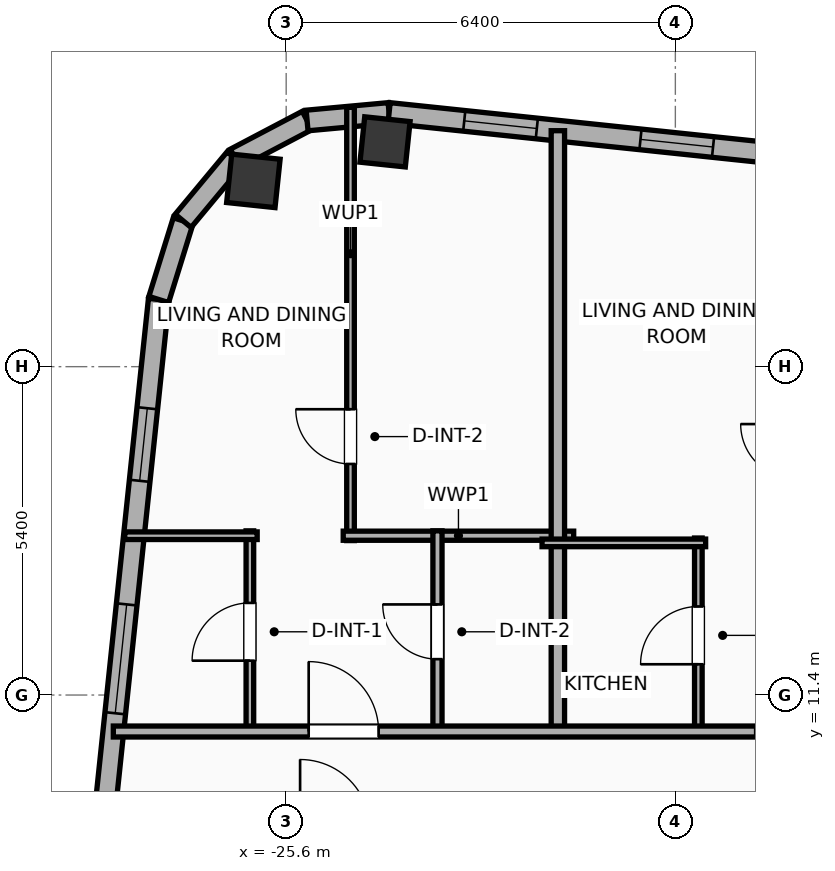
"""IFC4 building model, lengths in metres.
Left out: names, types, materials, properties, quantities, classifications, styles, units other than length and angle.
Written with IfcOpenShell. Run it as: python <this file> out.ifc"""

import sys

from ifc_helpers import new_model, si_unit, direction, frame, frame_2d, origin, origin_2d, place, context, subcontext, project, spatial, rectangle, hollow_rectangle, hollow_circle, extrude, element, fill, save


model = new_model("IFC4")
c1 = context("Model", 3, precision=1e-05, world=origin(), true_north=direction((0.0, 1.0)))
c2 = subcontext(c1, "Body", "Model", "MODEL_VIEW")
j1 = project(units=[si_unit("LENGTHUNIT", "METRE"), si_unit("PLANEANGLEUNIT", "RADIAN")], contexts=[c1])
p1 = place(None, origin())
s1 = spatial("IfcSite", under=j1, at=p1, CompositionType="ELEMENT")
p2 = place(p1, origin())
s2 = spatial("IfcBuilding", under=s1, at=p2, CompositionType="ELEMENT")
p3 = place(p2, frame((0.0, 0.0, 279.5)))
s3 = spatial("IfcBuildingStorey", under=s2, at=p3, CompositionType="ELEMENT", Elevation=279.5)
p4 = place(p3, frame((-23.975, 20.497, 0.0), z_axis=(0.0, 0.0, 1.0), x_axis=(0.994521895368, -0.104528463268, 0.0)))
e1 = element("IfcColumn", 1, at=p4, inside=s3, PredefinedType="COLUMN", context=c2, shape_type="SweptSolid", body=[
    extrude(hollow_rectangle(XDim=0.75, YDim=0.75, WallThickness=0.025, at=origin_2d()), origin(), (0.0, 0.0, 1.0), 3.9),
])
p5 = place(p3, frame((-26.139, 19.855, 0.0), z_axis=(0.0, 0.0, 1.0), x_axis=(0.994521895368, -0.104528463268, 0.0)))
e2 = element("IfcColumn", 2, at=p5, inside=s3, PredefinedType="COLUMN", context=c2, shape_type="SweptSolid", body=[
    extrude(hollow_circle(Radius=0.4, WallThickness=0.028, at=origin_2d()), origin(), (0.0, 0.0, 1.0), 3.9),
])
p6 = place(p3, frame((-30.87, -12.296, 0.0), z_axis=(0.0, 0.0, 1.0), x_axis=(0.104533282919, 0.994521388791, 0.0)))
e3 = element("IfcWall", 3, at=p6, inside=s3, PredefinedType="ELEMENTEDWALL", context=c2, shape_type="SweptSolid", body=[
    extrude(rectangle(XDim=30.366, YDim=0.34, at=frame_2d((15.183, 0.0))), origin(), (0.0, 0.0, 1.0), 3.65),
])
p7 = place(p6, frame((5.842, 0.0, 0.75)))
e4 = element("IfcOpeningElement", 4, at=p7, cuts=e3, PredefinedType="OPENING", context=c2, shape_type="SweptSolid", body=[
    extrude(rectangle(XDim=1.8, YDim=2.1, at=frame_2d((0.9, 1.05))), frame((0.0, 0.18, 0.0), z_axis=(0.0, -1.0, 0.0), x_axis=(1.0, 0.0, 0.0)), (0.0, 0.0, 1.0), 0.36),
])
p8 = place(p6, frame((23.525, 0.0, 0.75)))
e5 = element("IfcOpeningElement", 5, at=p8, cuts=e3, PredefinedType="OPENING", context=c2, shape_type="SweptSolid", body=[
    extrude(rectangle(XDim=1.8, YDim=2.1, at=frame_2d((0.9, 1.05))), frame((0.0, 0.18, 0.0), z_axis=(0.0, -1.0, 0.0), x_axis=(1.0, 0.0, 0.0)), (0.0, 0.0, 1.0), 0.36),
])
p9 = place(p6, frame((27.368, 0.0, 0.75)))
e6 = element("IfcOpeningElement", 6, at=p9, cuts=e3, PredefinedType="OPENING", context=c2, shape_type="SweptSolid", body=[
    extrude(rectangle(XDim=1.2, YDim=2.05, at=frame_2d((0.6, 1.025))), frame((0.0, 0.18, 0.0), z_axis=(0.0, -1.0, 0.0), x_axis=(1.0, 0.0, 0.0)), (0.0, 0.0, 1.0), 0.36),
])
p10 = place(p6, frame((16.487, 0.0, 0.75)))
e7 = element("IfcOpeningElement", 7, at=p10, cuts=e3, PredefinedType="OPENING", context=c2, shape_type="SweptSolid", body=[
    extrude(rectangle(XDim=1.2, YDim=2.05, at=frame_2d((0.6, 1.025))), frame((0.0, 0.18, 0.0), z_axis=(0.0, -1.0, 0.0), x_axis=(1.0, 0.0, 0.0)), (0.0, 0.0, 1.0), 0.36),
])
p11 = place(p3, frame((-27.696, 17.905, 0.0), z_axis=(0.0, 0.0, 1.0), x_axis=(0.296416228123, 0.955058856671, 0.0)))
e8 = element("IfcWall", 8, at=p11, inside=s3, PredefinedType="ELEMENTEDWALL", context=c2, shape_type="SweptSolid", body=[
    extrude(rectangle(XDim=1.354, YDim=0.34, at=frame_2d((0.677, 0.0))), origin(), (0.0, 0.0, 1.0), 3.65),
])
p12 = place(p3, frame((-27.294, 19.198, 0.0), z_axis=(0.0, 0.0, 1.0), x_axis=(0.639501603217, 0.768789762863, 0.0)))
e9 = element("IfcWall", 9, at=p12, inside=s3, PredefinedType="ELEMENTEDWALL", context=c2, shape_type="SweptSolid", body=[
    extrude(rectangle(XDim=1.337, YDim=0.34, at=frame_2d((0.668, 0.0))), origin(), (0.0, 0.0, 1.0), 3.65),
])
p13 = place(p3, frame((-26.439, 20.226, 0.0), z_axis=(0.0, 0.0, 1.0), x_axis=(0.884922182678, 0.465738908193, 0.0)))
e10 = element("IfcWall", 10, at=p13, inside=s3, PredefinedType="ELEMENTEDWALL", context=c2, shape_type="SweptSolid", body=[
    extrude(rectangle(XDim=1.337, YDim=0.34, at=frame_2d((0.668, 0.0))), origin(), (0.0, 0.0, 1.0), 3.65),
])
p14 = place(p3, frame((-25.256, 20.848, 0.0), z_axis=(0.0, 0.0, 1.0), x_axis=(0.995813013343, 0.091413579172, 0.0)))
e11 = element("IfcWall", 11, at=p14, inside=s3, PredefinedType="ELEMENTEDWALL", context=c2, shape_type="SweptSolid", body=[
    extrude(rectangle(XDim=1.354, YDim=0.34, at=frame_2d((0.677, 0.0))), origin(), (0.0, 0.0, 1.0), 3.65),
])
p15 = place(p3, frame((-23.908, 20.972, 0.0), z_axis=(0.0, 0.0, 1.0), x_axis=(0.994521888554, -0.104528528102, 0.0)))
e12 = element("IfcWall", 12, at=p15, inside=s3, PredefinedType="ELEMENTEDWALL", context=c2, shape_type="SweptSolid", body=[
    extrude(rectangle(XDim=46.766, YDim=0.34, at=frame_2d((23.383, 0.0))), origin(), (0.0, 0.0, 1.0), 3.65),
])
p16 = place(p15, frame((23.833, 0.0, 0.75)))
e13 = element("IfcOpeningElement", 13, at=p16, cuts=e12, PredefinedType="OPENING", context=c2, shape_type="SweptSolid", body=[
    extrude(rectangle(XDim=2.4, YDim=2.1, at=frame_2d((1.2, 1.05))), frame((0.0, 0.18, 0.0), z_axis=(0.0, -1.0, 0.0), x_axis=(1.0, 0.0, 0.0)), (0.0, 0.0, 1.0), 0.36),
])
p17 = place(p15, frame((1.243, 0.0, 0.75)))
e14 = element("IfcOpeningElement", 14, at=p17, cuts=e12, PredefinedType="OPENING", context=c2, shape_type="SweptSolid", body=[
    extrude(rectangle(XDim=1.2, YDim=2.05, at=frame_2d((0.6, 1.025))), frame((0.0, 0.18, 0.0), z_axis=(0.0, -1.0, 0.0), x_axis=(1.0, 0.0, 0.0)), (0.0, 0.0, 1.0), 0.36),
])
p18 = place(p15, frame((4.157, 0.0, 0.75)))
e15 = element("IfcOpeningElement", 15, at=p18, cuts=e12, PredefinedType="OPENING", context=c2, shape_type="SweptSolid", body=[
    extrude(rectangle(XDim=1.2, YDim=2.05, at=frame_2d((0.6, 1.025))), frame((0.0, 0.18, 0.0), z_axis=(0.0, -1.0, 0.0), x_axis=(1.0, 0.0, 0.0)), (0.0, 0.0, 1.0), 0.36),
])
p19 = place(p15, frame((7.475, 0.0, 0.75)))
e16 = element("IfcOpeningElement", 16, at=p19, cuts=e12, PredefinedType="OPENING", context=c2, shape_type="SweptSolid", body=[
    extrude(rectangle(XDim=1.2, YDim=2.05, at=frame_2d((0.6, 1.025))), frame((0.0, 0.18, 0.0), z_axis=(0.0, -1.0, 0.0), x_axis=(1.0, 0.0, 0.0)), (0.0, 0.0, 1.0), 0.36),
])
p20 = place(p15, frame((11.513, 0.0, 0.75)))
e17 = element("IfcOpeningElement", 17, at=p20, cuts=e12, PredefinedType="OPENING", context=c2, shape_type="SweptSolid", body=[
    extrude(rectangle(XDim=1.2, YDim=2.05, at=frame_2d((0.6, 1.025))), frame((0.0, 0.18, 0.0), z_axis=(0.0, -1.0, 0.0), x_axis=(1.0, 0.0, 0.0)), (0.0, 0.0, 1.0), 0.36),
])
p21 = place(p15, frame((15.192, 0.0, 0.75)))
e18 = element("IfcOpeningElement", 18, at=p21, cuts=e12, PredefinedType="OPENING", context=c2, shape_type="SweptSolid", body=[
    extrude(rectangle(XDim=1.2, YDim=2.05, at=frame_2d((0.6, 1.025))), frame((0.0, 0.18, 0.0), z_axis=(0.0, -1.0, 0.0), x_axis=(1.0, 0.0, 0.0)), (0.0, 0.0, 1.0), 0.36),
])
p22 = place(p15, frame((19.671, 0.0, 0.75)))
e19 = element("IfcOpeningElement", 19, at=p22, cuts=e12, PredefinedType="OPENING", context=c2, shape_type="SweptSolid", body=[
    extrude(rectangle(XDim=1.2, YDim=2.05, at=frame_2d((0.6, 1.025))), frame((0.0, 0.18, 0.0), z_axis=(0.0, -1.0, 0.0), x_axis=(1.0, 0.0, 0.0)), (0.0, 0.0, 1.0), 0.36),
])
p23 = place(p15, frame((29.801, 0.0, 0.75)))
e20 = element("IfcOpeningElement", 20, at=p23, cuts=e12, PredefinedType="OPENING", context=c2, shape_type="SweptSolid", body=[
    extrude(rectangle(XDim=1.2, YDim=2.05, at=frame_2d((0.6, 1.025))), frame((0.0, 0.18, 0.0), z_axis=(0.0, -1.0, 0.0), x_axis=(1.0, 0.0, 0.0)), (0.0, 0.0, 1.0), 0.36),
])
p24 = place(p15, frame((33.35, 0.0, 0.75)))
e21 = element("IfcOpeningElement", 21, at=p24, cuts=e12, PredefinedType="OPENING", context=c2, shape_type="SweptSolid", body=[
    extrude(rectangle(XDim=1.2, YDim=2.05, at=frame_2d((0.6, 1.025))), frame((0.0, 0.18, 0.0), z_axis=(0.0, -1.0, 0.0), x_axis=(1.0, 0.0, 0.0)), (0.0, 0.0, 1.0), 0.36),
])
p25 = place(p15, frame((38.034, 0.0, 0.75)))
e22 = element("IfcOpeningElement", 22, at=p25, cuts=e12, PredefinedType="OPENING", context=c2, shape_type="SweptSolid", body=[
    extrude(rectangle(XDim=0.85, YDim=2.05, at=frame_2d((0.425, 1.025))), frame((0.0, 0.18, 0.0), z_axis=(0.0, -1.0, 0.0), x_axis=(1.0, 0.0, 0.0)), (0.0, 0.0, 1.0), 0.36),
])
p26 = place(p15, frame((40.448, 0.0, 0.75)))
e23 = element("IfcOpeningElement", 23, at=p26, cuts=e12, PredefinedType="OPENING", context=c2, shape_type="SweptSolid", body=[
    extrude(rectangle(XDim=1.2, YDim=2.05, at=frame_2d((0.6, 1.025))), frame((0.0, 0.18, 0.0), z_axis=(0.0, -1.0, 0.0), x_axis=(1.0, 0.0, 0.0)), (0.0, 0.0, 1.0), 0.36),
])
p27 = place(p15, frame((43.718, 0.0, 0.75)))
e24 = element("IfcOpeningElement", 24, at=p27, cuts=e12, PredefinedType="OPENING", context=c2, shape_type="SweptSolid", body=[
    extrude(rectangle(XDim=1.2, YDim=2.05, at=frame_2d((0.6, 1.025))), frame((0.0, 0.18, 0.0), z_axis=(0.0, -1.0, 0.0), x_axis=(1.0, 0.0, 0.0)), (0.0, 0.0, 1.0), 0.36),
])
p28 = place(p3, frame((-24.542, 13.94, 0.0), z_axis=(0.0, 0.0, 1.0), x_axis=(0.0, 1.0, 0.0)))
e25 = element("IfcWall", 25, at=p28, inside=s3, PredefinedType="PARTITIONING", context=c2, shape_type="SweptSolid", body=[
    extrude(rectangle(XDim=7.125, YDim=0.125, at=frame_2d((3.562, 0.0))), origin(), (0.0, 0.0, 1.0), 3.65),
])
p29 = place(p28, frame((1.26, 0.0, 0.0)))
e26 = element("IfcOpeningElement", 26, at=p29, cuts=e25, PredefinedType="OPENING", context=c2, shape_type="SweptSolid", body=[
    extrude(rectangle(XDim=0.9, YDim=2.05, at=frame_2d((0.45, 1.025))), frame((0.0, 0.073, 0.0), z_axis=(0.0, -1.0, 0.0), x_axis=(1.0, 0.0, 0.0)), (0.0, 0.0, 1.0), 0.145),
])
p30 = place(p3, frame((-24.662, 14.02, 0.0), z_axis=(0.0, 0.0, 1.0), x_axis=(1.0, 0.0, 0.0)))
e27 = element("IfcWall", 27, at=p30, inside=s3, PredefinedType="PLUMBINGWALL", context=c2, shape_type="SweptSolid", body=[
    extrude(rectangle(XDim=3.79, YDim=0.15, at=frame_2d((1.895, 0.0))), origin(), (0.0, 0.0, 1.0), 3.65),
])
p31 = place(p3, frame((-26.197, 10.78, 0.0), z_axis=(0.0, 0.0, 1.0), x_axis=(0.0, 1.0, 0.0)))
e28 = element("IfcWall", 28, at=p31, inside=s3, PredefinedType="PARTITIONING", context=c2, shape_type="SweptSolid", body=[
    extrude(rectangle(XDim=3.32, YDim=0.125, at=frame_2d((1.66, 0.0))), origin(), (0.0, 0.0, 1.0), 3.65),
])
p32 = place(p31, frame((1.185, 0.0, 0.0)))
e29 = element("IfcOpeningElement", 29, at=p32, cuts=e28, PredefinedType="OPENING", context=c2, shape_type="SweptSolid", body=[
    extrude(rectangle(XDim=0.95, YDim=2.05, at=frame_2d((0.475, 1.025))), frame((0.0, 0.073, 0.0), z_axis=(0.0, -1.0, 0.0), x_axis=(1.0, 0.0, 0.0)), (0.0, 0.0, 1.0), 0.145),
])
p33 = place(p3, frame((-28.255, 14.02, 0.0), z_axis=(0.0, 0.0, 1.0), x_axis=(1.0, 0.0, 0.0)))
e30 = element("IfcWall", 30, at=p33, inside=s3, PredefinedType="PARTITIONING", context=c2, shape_type="SweptSolid", body=[
    extrude(rectangle(XDim=2.178, YDim=0.125, at=frame_2d((1.089, 0.0))), origin(), (0.0, 0.0, 1.0), 3.65),
])
p34 = place(p3, frame((-23.112, 10.78, 0.0), z_axis=(0.0, 0.0, 1.0), x_axis=(0.0, 1.0, 0.0)))
e31 = element("IfcWall", 31, at=p34, inside=s3, PredefinedType="PLUMBINGWALL", context=c2, shape_type="SweptSolid", body=[
    extrude(rectangle(XDim=3.32, YDim=0.15, at=frame_2d((1.66, 0.0))), origin(), (0.0, 0.0, 1.0), 3.65),
])
p35 = place(p34, frame((1.21, 0.0, 0.0)))
e32 = element("IfcOpeningElement", 32, at=p35, cuts=e31, PredefinedType="OPENING", context=c2, shape_type="SweptSolid", body=[
    extrude(rectangle(XDim=0.9, YDim=2.05, at=frame_2d((0.45, 1.025))), frame((0.0, 0.085, 0.0), z_axis=(0.0, -1.0, 0.0), x_axis=(1.0, 0.0, 0.0)), (0.0, 0.0, 1.0), 0.17),
])
p36 = place(p3, frame((-21.132, 10.72, 0.0), z_axis=(0.0, 0.0, 1.0), x_axis=(0.0, 1.0, 0.0)))
e33 = element("IfcWall", 33, at=p36, inside=s3, PredefinedType="PARTITIONING", context=c2, shape_type="SweptSolid", body=[
    extrude(rectangle(XDim=9.96, YDim=0.22, at=frame_2d((4.98, 0.0))), origin(), (0.0, 0.0, 1.0), 3.09),
])
p37 = place(p3, frame((-18.822, 10.78, 0.0), z_axis=(0.0, 0.0, 1.0), x_axis=(0.0, 1.0, 0.0)))
e34 = element("IfcWall", 34, at=p37, inside=s3, PredefinedType="PARTITIONING", context=c2, shape_type="SweptSolid", body=[
    extrude(rectangle(XDim=3.202, YDim=0.125, at=frame_2d((1.601, 0.0))), origin(), (0.0, 0.0, 1.0), 3.65),
])
p38 = place(p37, frame((1.126, 0.0, 0.0)))
e35 = element("IfcOpeningElement", 35, at=p38, cuts=e34, PredefinedType="OPENING", context=c2, shape_type="SweptSolid", body=[
    extrude(rectangle(XDim=0.95, YDim=2.05, at=frame_2d((0.475, 1.025))), frame((0.0, 0.073, 0.0), z_axis=(0.0, -1.0, 0.0), x_axis=(1.0, 0.0, 0.0)), (0.0, 0.0, 1.0), 0.145),
])
p39 = place(p3, frame((-21.392, 13.902, 0.0), z_axis=(0.0, 0.0, 1.0), x_axis=(1.0, 0.0, 0.0)))
e36 = element("IfcWall", 36, at=p39, inside=s3, PredefinedType="PARTITIONING", context=c2, shape_type="SweptSolid", body=[
    extrude(rectangle(XDim=2.69, YDim=0.125, at=frame_2d((1.345, 0.0))), origin(), (0.0, 0.0, 1.0), 3.65),
])
p40 = place(p3, frame((-28.443, 10.8, 0.0), z_axis=(0.0, 0.0, 1.0), x_axis=(1.0, 0.0, 0.0)))
e37 = element("IfcWall", 37, at=p40, inside=s3, PredefinedType="PARTITIONING", context=c2, shape_type="SweptSolid", body=[
    extrude(rectangle(XDim=53.956, YDim=0.18, at=frame_2d((26.978, 0.0))), origin(), (0.0, 0.0, 1.0), 3.65),
])
p41 = place(p40, frame((3.213, 0.0, 0.0)))
e38 = element("IfcOpeningElement", 38, at=p41, cuts=e37, PredefinedType="OPENING", context=c2, shape_type="SweptSolid", body=[
    extrude(rectangle(XDim=1.15, YDim=2.05, at=frame_2d((0.575, 1.025))), frame((0.0, 0.1, 0.0), z_axis=(0.0, -1.0, 0.0), x_axis=(1.0, 0.0, 0.0)), (0.0, 0.0, 1.0), 0.2),
])
p42 = place(p40, frame((10.556, 0.0, 0.0)))
e39 = element("IfcOpeningElement", 39, at=p42, cuts=e37, PredefinedType="OPENING", context=c2, shape_type="SweptSolid", body=[
    extrude(rectangle(XDim=1.15, YDim=2.05, at=frame_2d((0.575, 1.025))), frame((0.0, 0.1, 0.0), z_axis=(0.0, -1.0, 0.0), x_axis=(1.0, 0.0, 0.0)), (0.0, 0.0, 1.0), 0.2),
])
p43 = place(p40, frame((17.872, 0.0, 0.0)))
e40 = element("IfcOpeningElement", 40, at=p43, cuts=e37, PredefinedType="OPENING", context=c2, shape_type="SweptSolid", body=[
    extrude(rectangle(XDim=1.15, YDim=2.05, at=frame_2d((0.575, 1.025))), frame((0.0, 0.1, 0.0), z_axis=(0.0, -1.0, 0.0), x_axis=(1.0, 0.0, 0.0)), (0.0, 0.0, 1.0), 0.2),
])
p44 = place(p40, frame((24.45, 0.0, 0.0)))
e41 = element("IfcOpeningElement", 41, at=p44, cuts=e37, PredefinedType="OPENING", context=c2, shape_type="SweptSolid", body=[
    extrude(rectangle(XDim=0.9, YDim=2.05, at=frame_2d((0.45, 1.025))), frame((0.0, 0.1, 0.0), z_axis=(0.0, -1.0, 0.0), x_axis=(1.0, 0.0, 0.0)), (0.0, 0.0, 1.0), 0.2),
])
p45 = place(p40, frame((29.954, 0.0, 0.0)))
e42 = element("IfcOpeningElement", 42, at=p45, cuts=e37, PredefinedType="OPENING", context=c2, shape_type="SweptSolid", body=[
    extrude(rectangle(XDim=0.9, YDim=2.05, at=frame_2d((0.45, 1.025))), frame((0.0, 0.1, 0.0), z_axis=(0.0, -1.0, 0.0), x_axis=(1.0, 0.0, 0.0)), (0.0, 0.0, 1.0), 0.2),
])
p46 = place(p40, frame((36.186, 0.0, 0.0)))
e43 = element("IfcOpeningElement", 43, at=p46, cuts=e37, PredefinedType="OPENING", context=c2, shape_type="SweptSolid", body=[
    extrude(rectangle(XDim=0.9, YDim=2.05, at=frame_2d((0.45, 1.025))), frame((0.0, 0.1, 0.0), z_axis=(0.0, -1.0, 0.0), x_axis=(1.0, 0.0, 0.0)), (0.0, 0.0, 1.0), 0.2),
])
p47 = place(p40, frame((43.249, 0.0, 0.0)))
e44 = element("IfcOpeningElement", 44, at=p47, cuts=e37, PredefinedType="OPENING", context=c2, shape_type="SweptSolid", body=[
    extrude(rectangle(XDim=0.9, YDim=2.05, at=frame_2d((0.45, 1.025))), frame((0.0, 0.1, 0.0), z_axis=(0.0, -1.0, 0.0), x_axis=(1.0, 0.0, 0.0)), (0.0, 0.0, 1.0), 0.2),
])
p48 = place(p40, frame((50.311, 0.0, 0.0)))
e45 = element("IfcOpeningElement", 45, at=p48, cuts=e37, PredefinedType="OPENING", context=c2, shape_type="SweptSolid", body=[
    extrude(rectangle(XDim=0.9, YDim=2.05, at=frame_2d((0.45, 1.025))), frame((0.0, 0.1, 0.0), z_axis=(0.0, -1.0, 0.0), x_axis=(1.0, 0.0, 0.0)), (0.0, 0.0, 1.0), 0.2),
])
p49 = place(p8, origin())
e46 = element("IfcWindow", 46, at=p49, inside=s3, PartitioningType="SINGLE_PANEL", PredefinedType="WINDOW", context=c2, shape_type="SweptSolid", body=[
    extrude(rectangle(XDim=1.8, YDim=2.1, at=frame_2d((0.9, 1.05))), frame((0.0, 0.03, 0.0), z_axis=(0.0, -1.0, 0.0), x_axis=(1.0, 0.0, 0.0)), (0.0, 0.0, 1.0), 0.06),
])
fill(e5, e46)
p50 = place(p9, origin())
e47 = element("IfcWindow", 47, at=p50, inside=s3, PartitioningType="SINGLE_PANEL", PredefinedType="WINDOW", context=c2, shape_type="SweptSolid", body=[
    extrude(rectangle(XDim=1.2, YDim=2.05, at=frame_2d((0.6, 1.025))), frame((0.0, 0.03, 0.0), z_axis=(0.0, -1.0, 0.0), x_axis=(1.0, 0.0, 0.0)), (0.0, 0.0, 1.0), 0.06),
])
fill(e6, e47)
p51 = place(p17, origin())
e48 = element("IfcWindow", 48, at=p51, inside=s3, PartitioningType="SINGLE_PANEL", PredefinedType="WINDOW", context=c2, shape_type="SweptSolid", body=[
    extrude(rectangle(XDim=1.2, YDim=2.05, at=frame_2d((0.6, 1.025))), frame((0.0, 0.03, 0.0), z_axis=(0.0, -1.0, 0.0), x_axis=(1.0, 0.0, 0.0)), (0.0, 0.0, 1.0), 0.06),
])
fill(e14, e48)
p52 = place(p18, origin())
e49 = element("IfcWindow", 49, at=p52, inside=s3, PartitioningType="SINGLE_PANEL", PredefinedType="WINDOW", context=c2, shape_type="SweptSolid", body=[
    extrude(rectangle(XDim=1.2, YDim=2.05, at=frame_2d((0.6, 1.025))), frame((0.0, 0.03, 0.0), z_axis=(0.0, -1.0, 0.0), x_axis=(1.0, 0.0, 0.0)), (0.0, 0.0, 1.0), 0.06),
])
fill(e15, e49)
p53 = place(p29, origin())
e50 = element("IfcDoor", 50, at=p53, inside=s3, OperationType="SINGLE_SWING_RIGHT", PredefinedType="DOOR", context=c2, shape_type="SweptSolid", body=[
    extrude(rectangle(XDim=0.9, YDim=2.05, at=frame_2d((0.45, 1.025))), frame((0.0, 0.025, 0.0), z_axis=(0.0, -1.0, 0.0), x_axis=(1.0, 0.0, 0.0)), (0.0, 0.0, 1.0), 0.05),
])
fill(e26, e50)
p54 = place(p32, origin())
e51 = element("IfcDoor", 51, at=p54, inside=s3, OperationType="SINGLE_SWING_LEFT", PredefinedType="DOOR", context=c2, shape_type="SweptSolid", body=[
    extrude(rectangle(XDim=0.95, YDim=2.05, at=frame_2d((0.475, 1.025))), frame((0.0, 0.025, 0.0), z_axis=(0.0, -1.0, 0.0), x_axis=(1.0, 0.0, 0.0)), (0.0, 0.0, 1.0), 0.05),
])
fill(e29, e51)
p55 = place(p35, origin())
e52 = element("IfcDoor", 52, at=p55, inside=s3, OperationType="SINGLE_SWING_RIGHT", PredefinedType="DOOR", context=c2, shape_type="SweptSolid", body=[
    extrude(rectangle(XDim=0.9, YDim=2.05, at=frame_2d((0.45, 1.025))), frame((0.0, 0.025, 0.0), z_axis=(0.0, -1.0, 0.0), x_axis=(1.0, 0.0, 0.0)), (0.0, 0.0, 1.0), 0.05),
])
fill(e32, e52)
p56 = place(p38, origin())
e53 = element("IfcDoor", 53, at=p56, inside=s3, OperationType="SINGLE_SWING_LEFT", PredefinedType="DOOR", context=c2, shape_type="SweptSolid", body=[
    extrude(rectangle(XDim=0.95, YDim=2.05, at=frame_2d((0.475, 1.025))), frame((0.0, 0.025, 0.0), z_axis=(0.0, -1.0, 0.0), x_axis=(1.0, 0.0, 0.0)), (0.0, 0.0, 1.0), 0.05),
])
fill(e35, e53)
p57 = place(p41, origin())
e54 = element("IfcDoor", 54, at=p57, inside=s3, OperationType="SINGLE_SWING_LEFT", PredefinedType="DOOR", context=c2, shape_type="SweptSolid", body=[
    extrude(rectangle(XDim=1.15, YDim=2.05, at=frame_2d((0.575, 1.025))), frame((0.0, 0.025, 0.0), z_axis=(0.0, -1.0, 0.0), x_axis=(1.0, 0.0, 0.0)), (0.0, 0.0, 1.0), 0.05),
])
fill(e38, e54)
p58 = place(p42, origin())
e55 = element("IfcDoor", 55, at=p58, inside=s3, OperationType="SINGLE_SWING_RIGHT", PredefinedType="DOOR", context=c2, shape_type="SweptSolid", body=[
    extrude(rectangle(XDim=1.15, YDim=2.05, at=frame_2d((0.575, 1.025))), frame((0.0, 0.025, 0.0), z_axis=(0.0, -1.0, 0.0), x_axis=(1.0, 0.0, 0.0)), (0.0, 0.0, 1.0), 0.05),
])
fill(e39, e55)
save(model, sys.argv[1])
